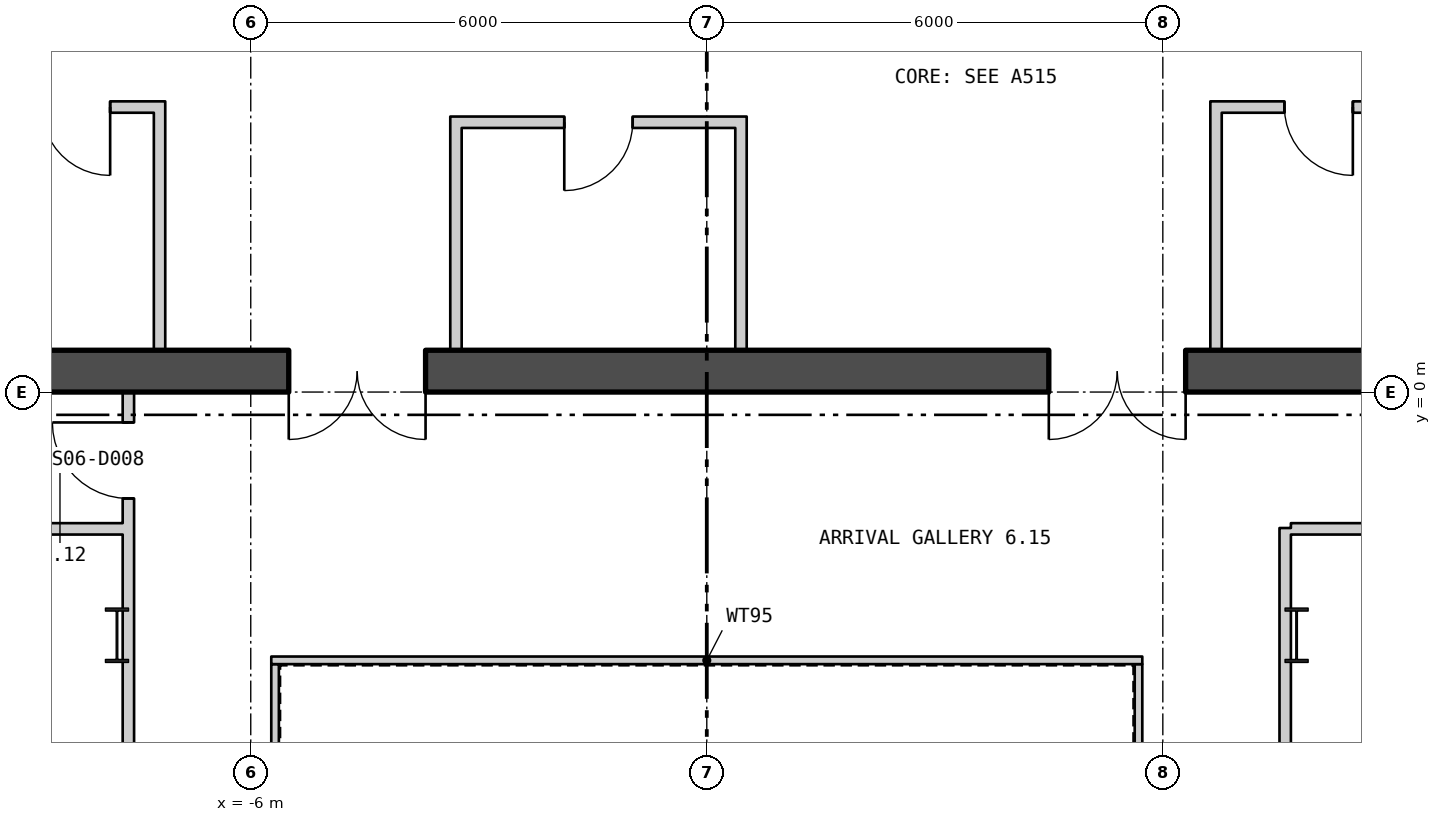
"""IFC4 building model, lengths in metres.
Left out: names, types, materials, properties, quantities, classifications, styles, units other than length and angle.
Written with IfcOpenShell. Run it as: python <this file> out.ifc"""

import sys

from ifc_helpers import new_model, si_unit, direction, frame, frame_2d, origin, origin_2d, place, context, subcontext, project, spatial, polyline, rectangle, i_section, outline, extrude, element, fill, save


model = new_model("IFC4")
c1 = context("Model", 3, precision=1e-05, world=origin(), true_north=direction((0.0, 1.0)))
c2 = subcontext(c1, "Body", "Model", "MODEL_VIEW")
j1 = project(units=[si_unit("LENGTHUNIT", "METRE"), si_unit("PLANEANGLEUNIT", "RADIAN")], contexts=[c1])
p1 = place(None, origin())
s1 = spatial("IfcSite", under=j1, at=p1, CompositionType="ELEMENT")
p2 = place(p1, origin())
s2 = spatial("IfcBuilding", under=s1, at=p2, CompositionType="ELEMENT")
p3 = place(p2, frame((0.0, 0.0, 84.3)))
s3 = spatial("IfcBuildingStorey", under=s2, at=p3, CompositionType="ELEMENT", Elevation=84.3)
for number, where, z_axis, x_axis in (
    (1, (7.76, -3.2, 0.0), (0.0, 0.0, 1.0), (1.0, 0.0, 0.0)),
    (2, (-7.76, -3.2, 0.0), (0.0, 0.0, 1.0), (1.0, 0.0, 0.0)),
):
    element("IfcColumn", number, at=place(p3, frame(where, z_axis=z_axis, x_axis=x_axis)), inside=s3, PredefinedType="COLUMN", context=c2, shape_type="SweptSolid", body=[
        extrude(i_section(OverallWidth=0.304, OverallDepth=0.716, WebThickness=0.021, FlangeThickness=0.04, at=origin_2d()), origin(), (0.0, 0.0, 1.0), 4.5),
    ])
p4 = place(p3, frame((-27.95, 11.167, -0.18), z_axis=(0.0, 0.0, 1.0), x_axis=(0.499999194392, -0.866025868902, 0.0)))
e3 = element("IfcWall", 3, at=p4, inside=s3, PredefinedType="SOLIDWALL", context=c2, shape_type="SweptSolid", body=[
    extrude(outline(polyline([(-0.13, -0.225), (45.86, -0.225), (45.6, 0.225), (0.13, 0.225), (-0.13, -0.225)])), origin(), (0.0, 0.0, 1.0), 4.28),
])
p5 = place(p4, frame((5.892, 0.0, 1.08)))
e4 = element("IfcOpeningElement", 4, at=p5, cuts=e3, PredefinedType="OPENING", context=c2, shape_type="SweptSolid", body=[
    extrude(rectangle(XDim=2.4, YDim=2.6, at=frame_2d((1.2, 1.3))), frame((0.0, 0.235, 0.0), z_axis=(0.0, -1.0, 0.0), x_axis=(1.0, 0.0, 0.0)), (0.0, 0.0, 1.0), 0.47),
])
p6 = place(p4, frame((10.399, 0.0, 1.08)))
e5 = element("IfcOpeningElement", 5, at=p6, cuts=e3, PredefinedType="OPENING", context=c2, shape_type="SweptSolid", body=[
    extrude(rectangle(XDim=2.4, YDim=2.6, at=frame_2d((1.2, 1.3))), frame((0.0, 0.235, 0.0), z_axis=(0.0, -1.0, 0.0), x_axis=(1.0, 0.0, 0.0)), (0.0, 0.0, 1.0), 0.47),
])
p7 = place(p4, frame((14.905, 0.0, 1.08)))
e6 = element("IfcOpeningElement", 6, at=p7, cuts=e3, PredefinedType="OPENING", context=c2, shape_type="SweptSolid", body=[
    extrude(rectangle(XDim=2.4, YDim=2.6, at=frame_2d((1.2, 1.3))), frame((0.0, 0.235, 0.0), z_axis=(0.0, -1.0, 0.0), x_axis=(1.0, 0.0, 0.0)), (0.0, 0.0, 1.0), 0.47),
])
p8 = place(p4, frame((19.412, 0.0, 1.08)))
e7 = element("IfcOpeningElement", 7, at=p8, cuts=e3, PredefinedType="OPENING", context=c2, shape_type="SweptSolid", body=[
    extrude(rectangle(XDim=2.4, YDim=2.6, at=frame_2d((1.2, 1.3))), frame((0.0, 0.235, 0.0), z_axis=(0.0, -1.0, 0.0), x_axis=(1.0, 0.0, 0.0)), (0.0, 0.0, 1.0), 0.47),
])
p9 = place(p4, frame((23.918, 0.0, 1.08)))
e8 = element("IfcOpeningElement", 8, at=p9, cuts=e3, PredefinedType="OPENING", context=c2, shape_type="SweptSolid", body=[
    extrude(rectangle(XDim=2.4, YDim=2.6, at=frame_2d((1.2, 1.3))), frame((0.0, 0.235, 0.0), z_axis=(0.0, -1.0, 0.0), x_axis=(1.0, 0.0, 0.0)), (0.0, 0.0, 1.0), 0.47),
])
p10 = place(p4, frame((28.425, 0.0, 1.08)))
e9 = element("IfcOpeningElement", 9, at=p10, cuts=e3, PredefinedType="OPENING", context=c2, shape_type="SweptSolid", body=[
    extrude(rectangle(XDim=2.4, YDim=2.6, at=frame_2d((1.2, 1.3))), frame((0.0, 0.235, 0.0), z_axis=(0.0, -1.0, 0.0), x_axis=(1.0, 0.0, 0.0)), (0.0, 0.0, 1.0), 0.47),
])
p11 = place(p4, frame((32.932, 0.0, 1.08)))
e10 = element("IfcOpeningElement", 10, at=p11, cuts=e3, PredefinedType="OPENING", context=c2, shape_type="SweptSolid", body=[
    extrude(rectangle(XDim=2.4, YDim=2.6, at=frame_2d((1.2, 1.3))), frame((0.0, 0.235, 0.0), z_axis=(0.0, -1.0, 0.0), x_axis=(1.0, 0.0, 0.0)), (0.0, 0.0, 1.0), 0.47),
])
p12 = place(p4, frame((37.438, 0.0, 1.08)))
e11 = element("IfcOpeningElement", 11, at=p12, cuts=e3, PredefinedType="OPENING", context=c2, shape_type="SweptSolid", body=[
    extrude(rectangle(XDim=2.4, YDim=2.6, at=frame_2d((1.2, 1.3))), frame((0.0, 0.235, 0.0), z_axis=(0.0, -1.0, 0.0), x_axis=(1.0, 0.0, 0.0)), (0.0, 0.0, 1.0), 0.47),
])
p13 = place(p4, frame((41.907, 0.0, 1.08)))
e12 = element("IfcOpeningElement", 12, at=p13, cuts=e3, PredefinedType="OPENING", context=c2, shape_type="SweptSolid", body=[
    extrude(rectangle(XDim=2.4, YDim=2.6, at=frame_2d((1.2, 1.3))), frame((0.0, 0.235, 0.0), z_axis=(0.0, -1.0, 0.0), x_axis=(1.0, 0.0, 0.0)), (0.0, 0.0, 1.0), 0.47),
])
p14 = place(p3, frame((5.085, -28.436, -0.18), z_axis=(0.0, 0.0, 1.0), x_axis=(0.499999194392, 0.866025868902, 0.0)))
e13 = element("IfcWall", 13, at=p14, inside=s3, PredefinedType="SOLIDWALL", context=c2, shape_type="SweptSolid", body=[
    extrude(outline(polyline([(-0.13, -0.225), (45.86, -0.225), (45.6, 0.225), (0.13, 0.225), (-0.13, -0.225)])), origin(), (0.0, 0.0, 1.0), 4.28),
])
p15 = place(p14, frame((1.424, 0.0, 1.08)))
e14 = element("IfcOpeningElement", 14, at=p15, cuts=e13, PredefinedType="OPENING", context=c2, shape_type="SweptSolid", body=[
    extrude(rectangle(XDim=2.4, YDim=2.6, at=frame_2d((1.2, 1.3))), frame((0.0, 0.235, 0.0), z_axis=(0.0, -1.0, 0.0), x_axis=(1.0, 0.0, 0.0)), (0.0, 0.0, 1.0), 0.47),
])
p16 = place(p14, frame((5.892, 0.0, 1.08)))
e15 = element("IfcOpeningElement", 15, at=p16, cuts=e13, PredefinedType="OPENING", context=c2, shape_type="SweptSolid", body=[
    extrude(rectangle(XDim=2.4, YDim=2.6, at=frame_2d((1.2, 1.3))), frame((0.0, 0.235, 0.0), z_axis=(0.0, -1.0, 0.0), x_axis=(1.0, 0.0, 0.0)), (0.0, 0.0, 1.0), 0.47),
])
p17 = place(p14, frame((10.399, 0.0, 1.08)))
e16 = element("IfcOpeningElement", 16, at=p17, cuts=e13, PredefinedType="OPENING", context=c2, shape_type="SweptSolid", body=[
    extrude(rectangle(XDim=2.4, YDim=2.6, at=frame_2d((1.2, 1.3))), frame((0.0, 0.235, 0.0), z_axis=(0.0, -1.0, 0.0), x_axis=(1.0, 0.0, 0.0)), (0.0, 0.0, 1.0), 0.47),
])
p18 = place(p14, frame((14.905, 0.0, 1.08)))
e17 = element("IfcOpeningElement", 17, at=p18, cuts=e13, PredefinedType="OPENING", context=c2, shape_type="SweptSolid", body=[
    extrude(rectangle(XDim=2.4, YDim=2.6, at=frame_2d((1.2, 1.3))), frame((0.0, 0.235, 0.0), z_axis=(0.0, -1.0, 0.0), x_axis=(1.0, 0.0, 0.0)), (0.0, 0.0, 1.0), 0.47),
])
p19 = place(p14, frame((19.412, 0.0, 1.08)))
e18 = element("IfcOpeningElement", 18, at=p19, cuts=e13, PredefinedType="OPENING", context=c2, shape_type="SweptSolid", body=[
    extrude(rectangle(XDim=2.4, YDim=2.6, at=frame_2d((1.2, 1.3))), frame((0.0, 0.235, 0.0), z_axis=(0.0, -1.0, 0.0), x_axis=(1.0, 0.0, 0.0)), (0.0, 0.0, 1.0), 0.47),
])
p20 = place(p14, frame((23.918, 0.0, 1.08)))
e19 = element("IfcOpeningElement", 19, at=p20, cuts=e13, PredefinedType="OPENING", context=c2, shape_type="SweptSolid", body=[
    extrude(rectangle(XDim=2.4, YDim=2.6, at=frame_2d((1.2, 1.3))), frame((0.0, 0.235, 0.0), z_axis=(0.0, -1.0, 0.0), x_axis=(1.0, 0.0, 0.0)), (0.0, 0.0, 1.0), 0.47),
])
p21 = place(p14, frame((28.425, 0.0, 1.08)))
e20 = element("IfcOpeningElement", 20, at=p21, cuts=e13, PredefinedType="OPENING", context=c2, shape_type="SweptSolid", body=[
    extrude(rectangle(XDim=2.4, YDim=2.6, at=frame_2d((1.2, 1.3))), frame((0.0, 0.235, 0.0), z_axis=(0.0, -1.0, 0.0), x_axis=(1.0, 0.0, 0.0)), (0.0, 0.0, 1.0), 0.47),
])
p22 = place(p14, frame((32.932, 0.0, 1.08)))
e21 = element("IfcOpeningElement", 21, at=p22, cuts=e13, PredefinedType="OPENING", context=c2, shape_type="SweptSolid", body=[
    extrude(rectangle(XDim=2.4, YDim=2.6, at=frame_2d((1.2, 1.3))), frame((0.0, 0.235, 0.0), z_axis=(0.0, -1.0, 0.0), x_axis=(1.0, 0.0, 0.0)), (0.0, 0.0, 1.0), 0.47),
])
p23 = place(p14, frame((37.438, 0.0, 1.08)))
e22 = element("IfcOpeningElement", 22, at=p23, cuts=e13, PredefinedType="OPENING", context=c2, shape_type="SweptSolid", body=[
    extrude(rectangle(XDim=2.4, YDim=2.6, at=frame_2d((1.2, 1.3))), frame((0.0, 0.235, 0.0), z_axis=(0.0, -1.0, 0.0), x_axis=(1.0, 0.0, 0.0)), (0.0, 0.0, 1.0), 0.47),
])
p24 = place(p14, frame((41.907, 0.0, 1.08)))
e23 = element("IfcOpeningElement", 23, at=p24, cuts=e13, PredefinedType="OPENING", context=c2, shape_type="SweptSolid", body=[
    extrude(rectangle(XDim=2.4, YDim=2.6, at=frame_2d((1.2, 1.3))), frame((0.0, 0.235, 0.0), z_axis=(0.0, -1.0, 0.0), x_axis=(1.0, 0.0, 0.0)), (0.0, 0.0, 1.0), 0.47),
])
p25 = place(p3, frame((5.68, -11.62, 0.0), z_axis=(0.0, 0.0, 1.0), x_axis=(0.0, 1.0, 0.0)))
e24 = element("IfcWall", 24, at=p25, inside=s3, PredefinedType="PARTITIONING", context=c2, shape_type="SweptSolid", body=[
    extrude(rectangle(XDim=8.04, YDim=0.1, at=frame_2d((4.02, 0.0))), origin(), (0.0, 0.0, 1.0), 4.3),
])
p26 = place(p3, frame((5.73, -3.53, 0.0), z_axis=(0.0, 0.0, 1.0), x_axis=(-1.0, 0.0, 0.0)))
e25 = element("IfcWall", 25, at=p26, inside=s3, PredefinedType="PARTITIONING", context=c2, shape_type="SweptSolid", body=[
    extrude(rectangle(XDim=11.46, YDim=0.1, at=frame_2d((5.73, 0.0))), origin(), (0.0, 0.0, 1.0), 4.3),
])
p27 = place(p3, frame((-5.68, -3.58, 0.0), z_axis=(0.0, 0.0, 1.0), x_axis=(0.0, -1.0, 0.0)))
e26 = element("IfcWall", 26, at=p27, inside=s3, PredefinedType="PARTITIONING", context=c2, shape_type="SweptSolid", body=[
    extrude(rectangle(XDim=8.04, YDim=0.1, at=frame_2d((4.02, 0.0))), origin(), (0.0, 0.0, 1.0), 4.3),
])
p28 = place(p3, frame((-17.5, 0.275, 0.0), z_axis=(0.0, 0.0, 1.0), x_axis=(1.0, 0.0, 0.0)))
e27 = element("IfcWall", 27, at=p28, inside=s3, PredefinedType="SHEAR", context=c2, shape_type="SweptSolid", body=[
    extrude(rectangle(XDim=35.0, YDim=0.55, at=frame_2d((17.5, 0.0))), origin(), (0.0, 0.0, 1.0), 4.3),
])
p29 = place(p28, frame((12.0, 0.0, 0.0)))
e28 = element("IfcOpeningElement", 28, at=p29, cuts=e27, PredefinedType="OPENING", context=c2, shape_type="SweptSolid", body=[
    extrude(rectangle(XDim=1.8, YDim=2.4, at=frame_2d((0.9, 1.2))), frame((0.0, 0.285, 0.0), z_axis=(0.0, -1.0, 0.0), x_axis=(1.0, 0.0, 0.0)), (0.0, 0.0, 1.0), 0.57),
])
p30 = place(p28, frame((22.0, 0.0, 0.0)))
e29 = element("IfcOpeningElement", 29, at=p30, cuts=e27, PredefinedType="OPENING", context=c2, shape_type="SweptSolid", body=[
    extrude(rectangle(XDim=1.8, YDim=2.4, at=frame_2d((0.9, 1.2))), frame((0.0, 0.285, 0.0), z_axis=(0.0, -1.0, 0.0), x_axis=(1.0, 0.0, 0.0)), (0.0, 0.0, 1.0), 0.57),
])
p31 = place(p3, frame((-7.2, 0.55, 0.0), z_axis=(0.0, 0.0, 1.0), x_axis=(0.0, 1.0, 0.0)))
e30 = element("IfcWall", 30, at=p31, inside=s3, PredefinedType="PARTITIONING", context=c2, shape_type="SweptSolid", body=[
    extrude(rectangle(XDim=3.275, YDim=0.15, at=frame_2d((1.637, 0.0))), origin(), (0.0, 0.0, 1.0), 4.3),
])
p32 = place(p3, frame((-9.325, 3.75, 0.0), z_axis=(0.0, 0.0, 1.0), x_axis=(1.0, 0.0, 0.0)))
e31 = element("IfcWall", 31, at=p32, inside=s3, PredefinedType="PARTITIONING", context=c2, shape_type="SweptSolid", body=[
    extrude(rectangle(XDim=2.05, YDim=0.15, at=frame_2d((1.025, 0.0))), origin(), (0.0, 0.0, 1.0), 4.3),
])
p33 = place(p32, frame((0.575, 0.0, 0.0)))
e32 = element("IfcOpeningElement", 32, at=p33, cuts=e31, PredefinedType="OPENING", context=c2, shape_type="SweptSolid", body=[
    extrude(rectangle(XDim=0.9, YDim=2.1, at=frame_2d((0.45, 1.05))), frame((0.0, 0.085, 0.0), z_axis=(0.0, -1.0, 0.0), x_axis=(1.0, 0.0, 0.0)), (0.0, 0.0, 1.0), 0.17),
])
for number, where, z_axis, x_axis in (
    (33, (-3.3, 0.55, 0.0), (0.0, 0.0, 1.0), (0.0, 1.0, 0.0)),
    (34, (0.45, 0.55, 0.0), (0.0, 0.0, 1.0), (0.0, 1.0, 0.0)),
):
    element("IfcWall", number, at=place(p3, frame(where, z_axis=z_axis, x_axis=x_axis)), inside=s3, PredefinedType="PARTITIONING", context=c2, shape_type="SweptSolid", body=[
        extrude(rectangle(XDim=3.075, YDim=0.15, at=frame_2d((1.538, 0.0))), origin(), (0.0, 0.0, 1.0), 4.3),
    ])
p34 = place(p3, frame((-3.225, 3.55, 0.0), z_axis=(0.0, 0.0, 1.0), x_axis=(1.0, 0.0, 0.0)))
e35 = element("IfcWall", 35, at=p34, inside=s3, PredefinedType="PARTITIONING", context=c2, shape_type="SweptSolid", body=[
    extrude(rectangle(XDim=3.6, YDim=0.15, at=frame_2d((1.8, 0.0))), origin(), (0.0, 0.0, 1.0), 4.3),
])
p35 = place(p34, frame((1.35, 0.0, 0.0)))
e36 = element("IfcOpeningElement", 36, at=p35, cuts=e35, PredefinedType="OPENING", context=c2, shape_type="SweptSolid", body=[
    extrude(rectangle(XDim=0.9, YDim=2.1, at=frame_2d((0.45, 1.05))), frame((0.0, 0.085, 0.0), z_axis=(0.0, -1.0, 0.0), x_axis=(1.0, 0.0, 0.0)), (0.0, 0.0, 1.0), 0.17),
])
p36 = place(p3, frame((6.7, 0.55, 0.0), z_axis=(0.0, 0.0, 1.0), x_axis=(0.0, 1.0, 0.0)))
e37 = element("IfcWall", 37, at=p36, inside=s3, PredefinedType="PARTITIONING", context=c2, shape_type="SweptSolid", body=[
    extrude(rectangle(XDim=3.275, YDim=0.15, at=frame_2d((1.637, 0.0))), origin(), (0.0, 0.0, 1.0), 4.3),
])
p37 = place(p3, frame((6.775, 3.75, 0.0), z_axis=(0.0, 0.0, 1.0), x_axis=(1.0, 0.0, 0.0)))
e38 = element("IfcWall", 38, at=p37, inside=s3, PredefinedType="PARTITIONING", context=c2, shape_type="SweptSolid", body=[
    extrude(rectangle(XDim=2.55, YDim=0.15, at=frame_2d((1.275, 0.0))), origin(), (0.0, 0.0, 1.0), 4.3),
])
p38 = place(p37, frame((0.825, 0.0, 0.0)))
e39 = element("IfcOpeningElement", 39, at=p38, cuts=e38, PredefinedType="OPENING", context=c2, shape_type="SweptSolid", body=[
    extrude(rectangle(XDim=0.9, YDim=2.1, at=frame_2d((0.45, 1.05))), frame((0.0, 0.085, 0.0), z_axis=(0.0, -1.0, 0.0), x_axis=(1.0, 0.0, 0.0)), (0.0, 0.0, 1.0), 0.17),
])
p39 = place(p3, frame((-19.375, -1.8, 0.0), z_axis=(0.0, 0.0, 1.0), x_axis=(1.0, 0.0, 0.0)))
e40 = element("IfcWall", 40, at=p39, inside=s3, PredefinedType="PARTITIONING", context=c2, shape_type="SweptSolid", body=[
    extrude(rectangle(XDim=11.69, YDim=0.15, at=frame_2d((5.845, 0.0))), origin(), (0.0, 0.0, 1.0), 4.3),
])
p40 = place(p39, frame((2.365, 0.0, 0.0)))
e41 = element("IfcOpeningElement", 41, at=p40, cuts=e40, PredefinedType="OPENING", context=c2, shape_type="SweptSolid", body=[
    extrude(rectangle(XDim=1.0, YDim=2.1, at=frame_2d((0.5, 1.05))), frame((0.0, 0.085, 0.0), z_axis=(0.0, -1.0, 0.0), x_axis=(1.0, 0.0, 0.0)), (0.0, 0.0, 1.0), 0.17),
])
p41 = place(p3, frame((-7.61, -13.675, 0.0), z_axis=(0.0, 0.0, 1.0), x_axis=(0.0, 1.0, 0.0)))
e42 = element("IfcWall", 42, at=p41, inside=s3, PredefinedType="PARTITIONING", context=c2, shape_type="SweptSolid", body=[
    extrude(rectangle(XDim=10.167, YDim=0.15, at=frame_2d((5.083, 0.0))), origin(), (0.0, 0.0, 1.0), 3.7),
])
p42 = place(p3, frame((-7.61, -3.508, 0.0), z_axis=(0.0, 0.0, 1.0), x_axis=(0.0, 1.0, 0.0)))
e43 = element("IfcWall", 43, at=p42, inside=s3, PredefinedType="PARTITIONING", context=c2, shape_type="SweptSolid", body=[
    extrude(rectangle(XDim=3.508, YDim=0.15, at=frame_2d((1.754, 0.0))), origin(), (0.0, 0.0, 1.0), 4.3),
])
p43 = place(p42, frame((2.108, 0.0, 0.0)))
e44 = element("IfcOpeningElement", 44, at=p43, cuts=e43, PredefinedType="OPENING", context=c2, shape_type="SweptSolid", body=[
    extrude(rectangle(XDim=1.0, YDim=2.1, at=frame_2d((0.5, 1.05))), frame((0.0, 0.085, 0.0), z_axis=(0.0, -1.0, 0.0), x_axis=(1.0, 0.0, 0.0)), (0.0, 0.0, 1.0), 0.17),
])
p44 = place(p3, frame((7.61, -13.675, 0.0), z_axis=(0.0, 0.0, 1.0), x_axis=(0.0, 1.0, 0.0)))
e45 = element("IfcWall", 45, at=p44, inside=s3, PredefinedType="PARTITIONING", context=c2, shape_type="SweptSolid", body=[
    extrude(rectangle(XDim=10.167, YDim=0.15, at=frame_2d((5.083, 0.0))), origin(), (0.0, 0.0, 1.0), 3.7),
])
p45 = place(p3, frame((7.61, -3.508, 0.0), z_axis=(0.0, 0.0, 1.0), x_axis=(0.0, 1.0, 0.0)))
e46 = element("IfcWall", 46, at=p45, inside=s3, PredefinedType="PARTITIONING", context=c2, shape_type="SweptSolid", body=[
    extrude(rectangle(XDim=1.719, YDim=0.15, at=frame_2d((0.86, 0.0))), origin(), (0.0, 0.0, 1.0), 4.3),
])
p46 = place(p3, frame((7.685, -1.8, 0.0), z_axis=(0.0, 0.0, 1.0), x_axis=(1.0, 0.0, 0.0)))
e47 = element("IfcWall", 47, at=p46, inside=s3, PredefinedType="PARTITIONING", context=c2, shape_type="SweptSolid", body=[
    extrude(rectangle(XDim=11.54, YDim=0.15, at=frame_2d((5.77, 0.0))), origin(), (0.0, 0.0, 1.0), 4.3),
])
p47 = place(p33, origin())
e48 = element("IfcDoor", 48, at=p47, inside=s3, OperationType="SINGLE_SWING_RIGHT", PredefinedType="DOOR", context=c2, shape_type="SweptSolid", body=[
    extrude(rectangle(XDim=0.9, YDim=2.1, at=frame_2d((0.45, 1.05))), frame((0.0, 0.025, 0.0), z_axis=(0.0, -1.0, 0.0), x_axis=(1.0, 0.0, 0.0)), (0.0, 0.0, 1.0), 0.05),
])
fill(e32, e48)
p48 = place(p35, origin())
e49 = element("IfcDoor", 49, at=p48, inside=s3, OperationType="SINGLE_SWING_LEFT", PredefinedType="DOOR", context=c2, shape_type="SweptSolid", body=[
    extrude(rectangle(XDim=0.9, YDim=2.1, at=frame_2d((0.45, 1.05))), frame((0.0, 0.025, 0.0), z_axis=(0.0, -1.0, 0.0), x_axis=(1.0, 0.0, 0.0)), (0.0, 0.0, 1.0), 0.05),
])
fill(e36, e49)
p49 = place(p38, origin())
e50 = element("IfcDoor", 50, at=p49, inside=s3, OperationType="SINGLE_SWING_RIGHT", PredefinedType="DOOR", context=c2, shape_type="SweptSolid", body=[
    extrude(rectangle(XDim=0.9, YDim=2.1, at=frame_2d((0.45, 1.05))), frame((0.0, 0.025, 0.0), z_axis=(0.0, -1.0, 0.0), x_axis=(1.0, 0.0, 0.0)), (0.0, 0.0, 1.0), 0.05),
])
fill(e39, e50)
p50 = place(p29, origin())
e51 = element("IfcDoor", 51, at=p50, inside=s3, OperationType="DOUBLE_DOOR_SINGLE_SWING", PredefinedType="DOOR", context=c2, shape_type="SweptSolid", body=[
    extrude(rectangle(XDim=1.8, YDim=2.4, at=frame_2d((0.9, 1.2))), frame((0.0, 0.025, 0.0), z_axis=(0.0, -1.0, 0.0), x_axis=(1.0, 0.0, 0.0)), (0.0, 0.0, 1.0), 0.05),
])
fill(e28, e51)
p51 = place(p30, origin())
e52 = element("IfcDoor", 52, at=p51, inside=s3, OperationType="DOUBLE_DOOR_SINGLE_SWING", PredefinedType="DOOR", context=c2, shape_type="SweptSolid", body=[
    extrude(rectangle(XDim=1.8, YDim=2.4, at=frame_2d((0.9, 1.2))), frame((0.0, 0.025, 0.0), z_axis=(0.0, -1.0, 0.0), x_axis=(1.0, 0.0, 0.0)), (0.0, 0.0, 1.0), 0.05),
])
fill(e29, e52)
p52 = place(p43, origin())
e53 = element("IfcDoor", 53, at=p52, inside=s3, OperationType="SINGLE_SWING_LEFT", PredefinedType="DOOR", context=c2, shape_type="SweptSolid", body=[
    extrude(rectangle(XDim=1.0, YDim=2.1, at=frame_2d((0.5, 1.05))), frame((0.0, 0.025, 0.0), z_axis=(0.0, -1.0, 0.0), x_axis=(1.0, 0.0, 0.0)), (0.0, 0.0, 1.0), 0.05),
])
fill(e44, e53)
save(model, sys.argv[1])
